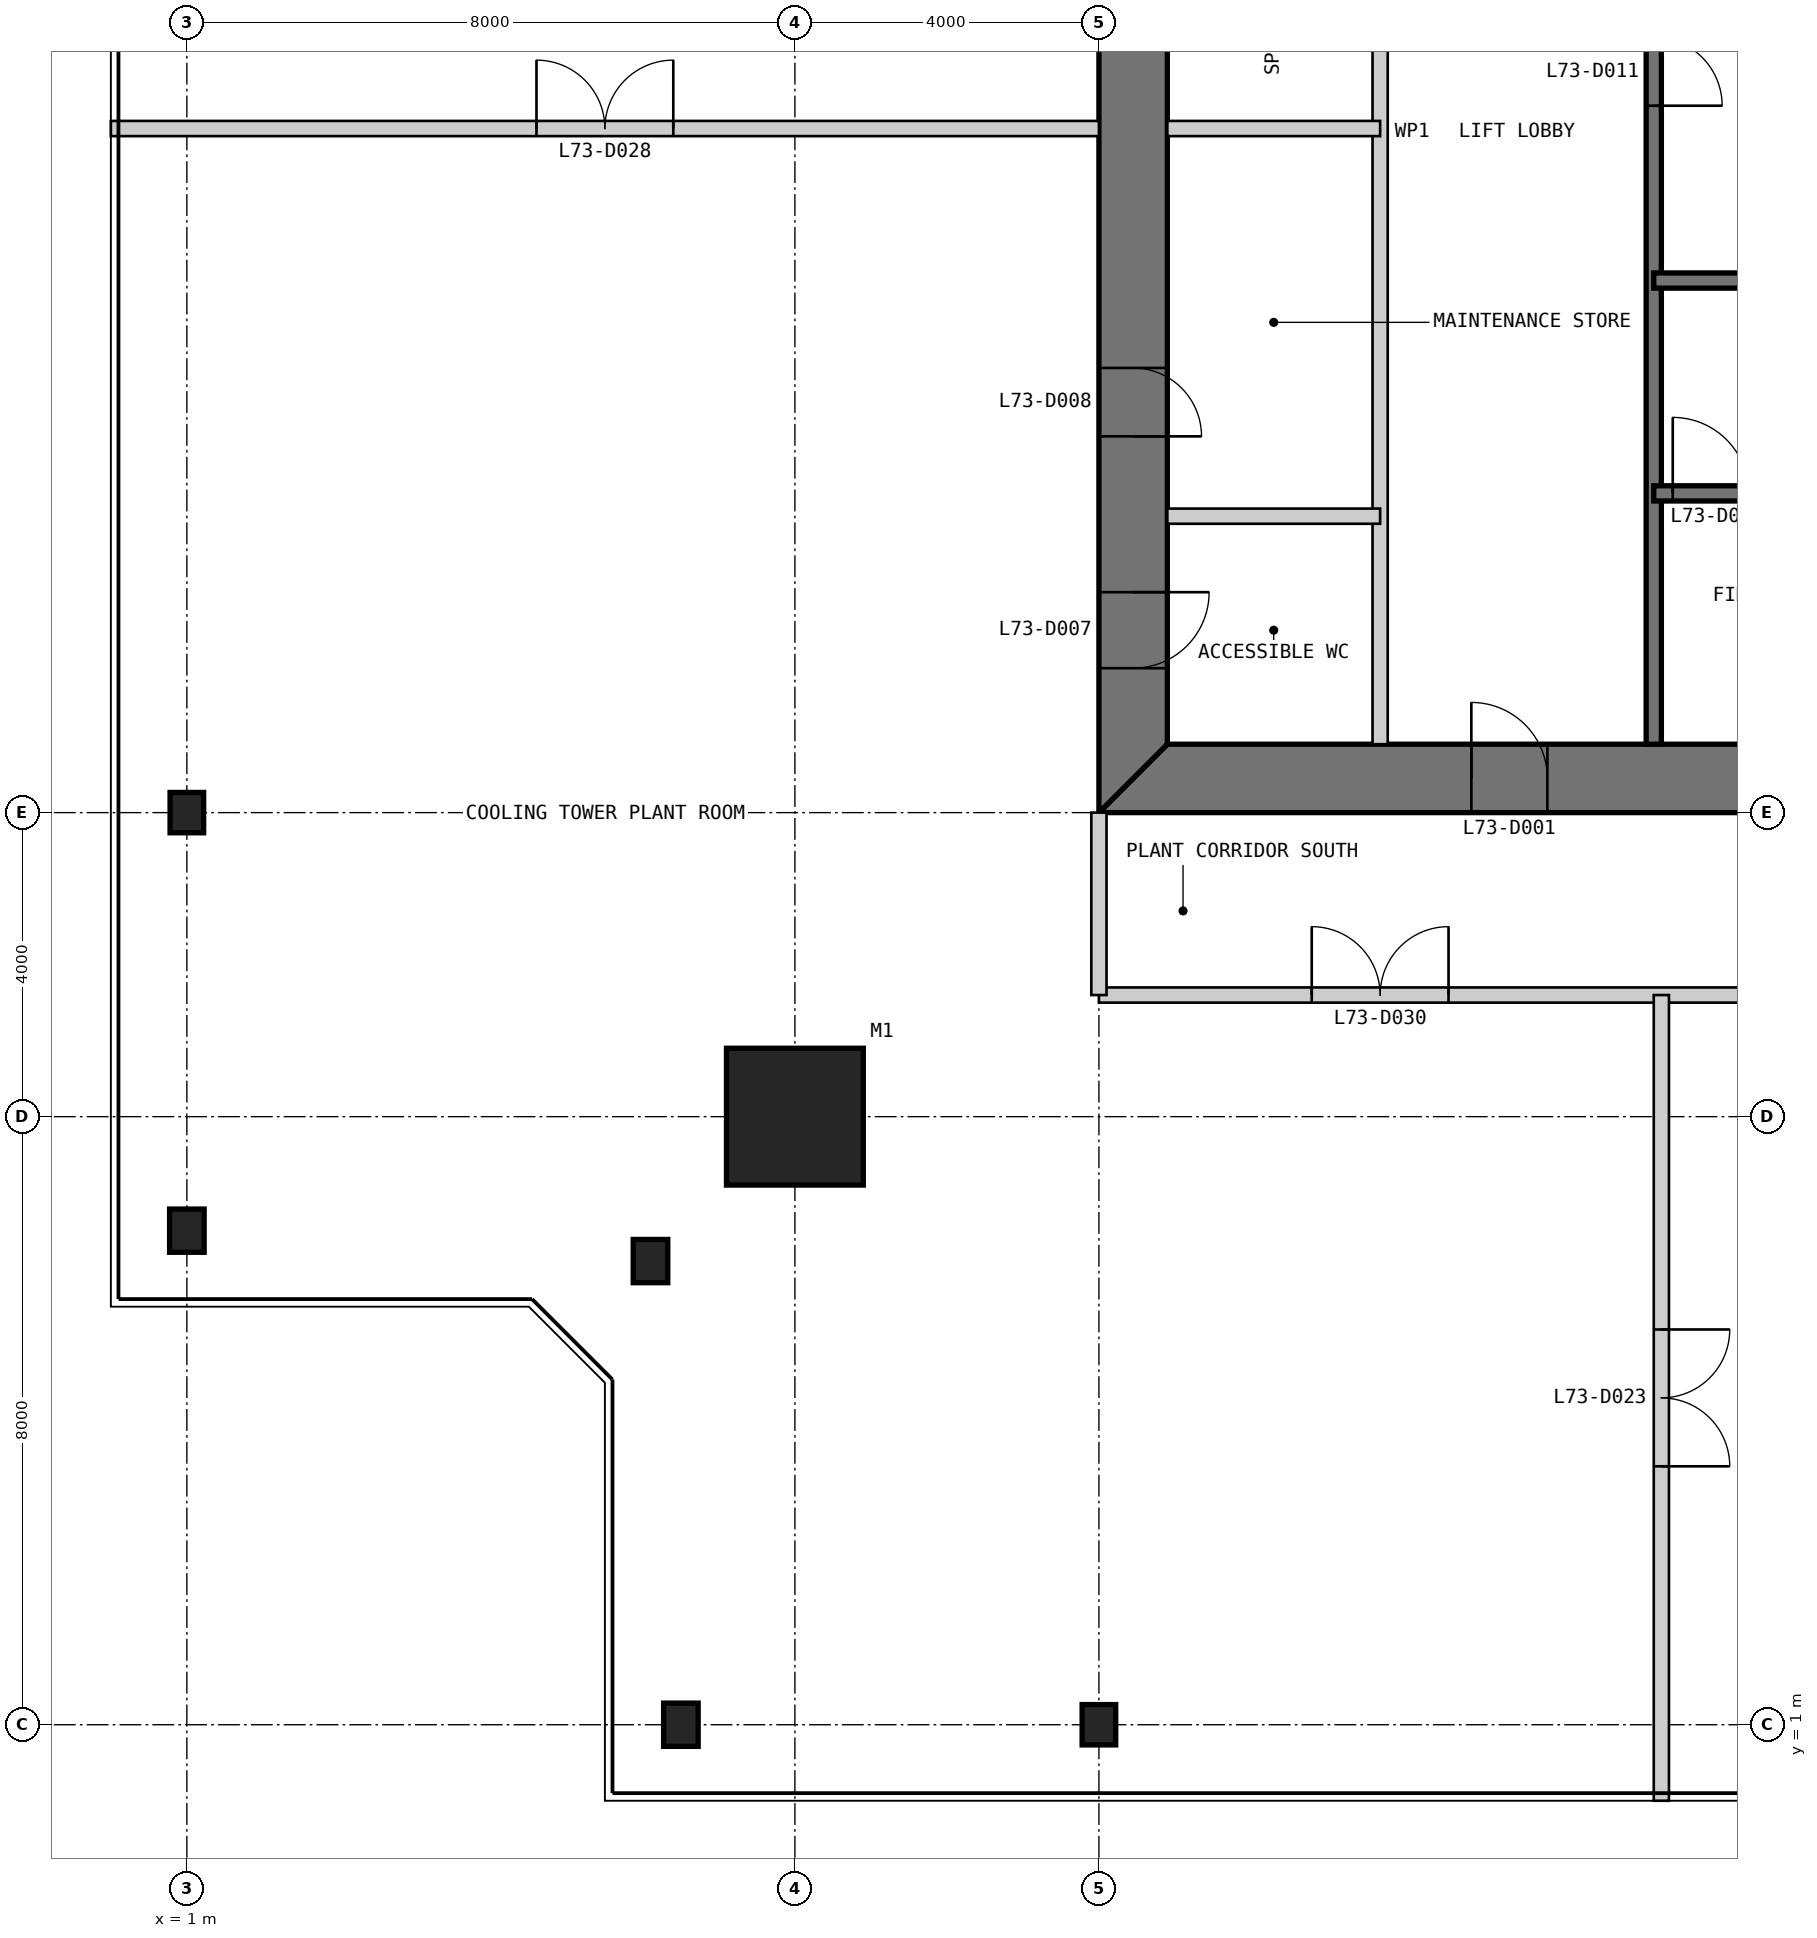
"""IFC4 building model, lengths in metres.
Left out: names, types, materials, properties, quantities, classifications, styles, units other than length and angle.
Written with IfcOpenShell. Run it as: python <this file> out.ifc"""

import sys

from ifc_helpers import new_model, si_unit, direction, frame, frame_2d, origin, origin_2d, place, context, subcontext, project, spatial, polyline, rectangle, i_section, outline, extrude, element, fill, save


model = new_model("IFC4")
c1 = context("Model", 3, precision=1e-05, world=origin(), true_north=direction((0.0, 1.0)))
c2 = subcontext(c1, "Body", "Model", "MODEL_VIEW")
j1 = project(units=[si_unit("LENGTHUNIT", "METRE"), si_unit("PLANEANGLEUNIT", "RADIAN")], contexts=[c1])
p1 = place(None, origin())
s1 = spatial("IfcSite", under=j1, at=p1, CompositionType="ELEMENT")
p2 = place(p1, origin())
s2 = spatial("IfcBuilding", under=s1, at=p2, CompositionType="ELEMENT")
p3 = place(p2, frame((0.0, 0.0, 301.8)))
s3 = spatial("IfcBuildingStorey", under=s2, at=p3, CompositionType="ELEMENT", Elevation=301.8)
p4 = place(p3, frame((9.0, 9.0, 0.0), z_axis=(0.0, 0.0, 1.0), x_axis=(1.0, 0.0, 0.0)))
e1 = element("IfcColumn", 1, at=p4, inside=s3, PredefinedType="COLUMN", context=c2, shape_type="SweptSolid", body=[
    extrude(rectangle(XDim=1.8, YDim=1.8, at=origin_2d()), origin(), (0.0, 0.0, 1.0), 6.0),
])
p5 = place(p3, frame((7.5, 1.0, 0.0), z_axis=(0.0, 0.0, 1.0), x_axis=(1.0, 0.0, 0.0)))
e2 = element("IfcColumn", 2, at=p5, inside=s3, PredefinedType="COLUMN", context=c2, shape_type="SweptSolid", body=[
    extrude(i_section(OverallWidth=0.455, OverallDepth=0.569, WebThickness=0.078, FlangeThickness=0.125, at=origin_2d()), origin(), (0.0, 0.0, 1.0), 6.0),
])
for number, where, z_axis, x_axis in (
    (3, (13.0, 1.0, 0.0), (0.0, 0.0, 1.0), (1.0, 0.0, 0.0)),
    (4, (1.0, 13.0, 0.0), (0.0, 0.0, 1.0), (1.0, 0.0, 0.0)),
):
    element("IfcColumn", number, at=place(p3, frame(where, z_axis=z_axis, x_axis=x_axis)), inside=s3, PredefinedType="COLUMN", context=c2, shape_type="SweptSolid", body=[
        extrude(i_section(OverallWidth=0.442, OverallDepth=0.531, WebThickness=0.066, FlangeThickness=0.106, at=origin_2d()), origin(), (0.0, 0.0, 1.0), 6.0),
    ])
for number, where, z_axis, x_axis in (
    (5, (1.0, 7.5, 0.0), (0.0, 0.0, 1.0), (1.0, 0.0, 0.0)),
    (6, (7.1, 7.1, 0.0), (0.0, 0.0, 1.0), (1.0, 0.0, 0.0)),
):
    element("IfcColumn", number, at=place(p3, frame(where, z_axis=z_axis, x_axis=x_axis)), inside=s3, PredefinedType="COLUMN", context=c2, shape_type="SweptSolid", body=[
        extrude(i_section(OverallWidth=0.455, OverallDepth=0.569, WebThickness=0.078, FlangeThickness=0.125, at=origin_2d()), origin(), (0.0, 0.0, 1.0), 6.0),
    ])
p6 = place(p3, frame((13.0, 13.45, 0.0), z_axis=(0.0, 0.0, 1.0), x_axis=(1.0, 0.0, 0.0)))
e7 = element("IfcWall", 7, at=p6, inside=s3, PredefinedType="SHEAR", context=c2, shape_type="SweptSolid", body=[
    extrude(outline(polyline([(0.0, -0.45), (24.0, -0.45), (23.1, 0.45), (0.9, 0.45), (0.0, -0.45)])), origin(), (0.0, 0.0, 1.0), 6.0),
])
p7 = place(p6, frame((4.9, 0.0, 0.0)))
e8 = element("IfcOpeningElement", 8, at=p7, cuts=e7, PredefinedType="OPENING", context=c2, shape_type="SweptSolid", body=[
    extrude(rectangle(XDim=1.0, YDim=2.2, at=frame_2d((0.5, 1.1))), frame((0.0, 0.46, 0.0), z_axis=(0.0, -1.0, 0.0), x_axis=(1.0, 0.0, 0.0)), (0.0, 0.0, 1.0), 0.92),
])
p8 = place(p6, frame((8.9, 0.0, 0.0)))
e9 = element("IfcOpeningElement", 9, at=p8, cuts=e7, PredefinedType="OPENING", context=c2, shape_type="SweptSolid", body=[
    extrude(rectangle(XDim=1.1, YDim=2.2, at=frame_2d((0.55, 1.1))), frame((0.0, 0.46, 0.0), z_axis=(0.0, -1.0, 0.0), x_axis=(1.0, 0.0, 0.0)), (0.0, 0.0, 1.0), 0.92),
])
p9 = place(p6, frame((15.05, 0.0, 0.0)))
e10 = element("IfcOpeningElement", 10, at=p9, cuts=e7, PredefinedType="OPENING", context=c2, shape_type="SweptSolid", body=[
    extrude(rectangle(XDim=0.9, YDim=2.2, at=frame_2d((0.45, 1.1))), frame((0.0, 0.46, 0.0), z_axis=(0.0, -1.0, 0.0), x_axis=(1.0, 0.0, 0.0)), (0.0, 0.0, 1.0), 0.92),
])
p10 = place(p6, frame((17.9, 0.0, 0.0)))
e11 = element("IfcOpeningElement", 11, at=p10, cuts=e7, PredefinedType="OPENING", context=c2, shape_type="SweptSolid", body=[
    extrude(rectangle(XDim=1.0, YDim=2.2, at=frame_2d((0.5, 1.1))), frame((0.0, 0.46, 0.0), z_axis=(0.0, -1.0, 0.0), x_axis=(1.0, 0.0, 0.0)), (0.0, 0.0, 1.0), 0.92),
])
p11 = place(p6, frame((21.4, 0.0, 0.0)))
e12 = element("IfcOpeningElement", 12, at=p11, cuts=e7, PredefinedType="OPENING", context=c2, shape_type="SweptSolid", body=[
    extrude(rectangle(XDim=1.0, YDim=2.2, at=frame_2d((0.5, 1.1))), frame((0.0, 0.46, 0.0), z_axis=(0.0, -1.0, 0.0), x_axis=(1.0, 0.0, 0.0)), (0.0, 0.0, 1.0), 0.92),
])
p12 = place(p3, frame((13.45, 36.1, 0.0), z_axis=(0.0, 0.0, 1.0), x_axis=(0.0, -1.0, 0.0)))
e13 = element("IfcWall", 13, at=p12, inside=s3, PredefinedType="SHEAR", context=c2, shape_type="SweptSolid", body=[
    extrude(outline(polyline([(-0.9, -0.45), (23.1, -0.45), (22.2, 0.45), (0.0, 0.45), (-0.9, -0.45)])), origin(), (0.0, 0.0, 1.0), 6.0),
])
p13 = place(p12, frame((20.2, 0.0, 0.0)))
e14 = element("IfcOpeningElement", 14, at=p13, cuts=e13, PredefinedType="OPENING", context=c2, shape_type="SweptSolid", body=[
    extrude(rectangle(XDim=1.0, YDim=2.2, at=frame_2d((0.5, 1.1))), frame((0.0, 0.46, 0.0), z_axis=(0.0, -1.0, 0.0), x_axis=(1.0, 0.0, 0.0)), (0.0, 0.0, 1.0), 0.92),
])
p14 = place(p12, frame((17.25, 0.0, 0.0)))
e15 = element("IfcOpeningElement", 15, at=p14, cuts=e13, PredefinedType="OPENING", context=c2, shape_type="SweptSolid", body=[
    extrude(rectangle(XDim=0.9, YDim=2.2, at=frame_2d((0.45, 1.1))), frame((0.0, 0.46, 0.0), z_axis=(0.0, -1.0, 0.0), x_axis=(1.0, 0.0, 0.0)), (0.0, 0.0, 1.0), 0.92),
])
p15 = place(p3, frame((16.7, 13.9, 0.0), z_axis=(0.0, 0.0, 1.0), x_axis=(0.0, 1.0, 0.0)))
e16 = element("IfcWall", 16, at=p15, inside=s3, PredefinedType="PARTITIONING", context=c2, shape_type="SweptSolid", body=[
    extrude(rectangle(XDim=16.1, YDim=0.2, at=frame_2d((8.05, 0.0))), origin(), (0.0, 0.0, 1.0), 5.8),
])
p16 = place(p15, frame((9.65, 0.0, 0.0)))
e17 = element("IfcOpeningElement", 17, at=p16, cuts=e16, PredefinedType="OPENING", context=c2, shape_type="SweptSolid", body=[
    extrude(rectangle(XDim=0.9, YDim=2.2, at=frame_2d((0.45, 1.1))), frame((0.0, 0.11, 0.0), z_axis=(0.0, -1.0, 0.0), x_axis=(1.0, 0.0, 0.0)), (0.0, 0.0, 1.0), 0.22),
])
p17 = place(p15, frame((13.65, 0.0, 0.0)))
e18 = element("IfcOpeningElement", 18, at=p17, cuts=e16, PredefinedType="OPENING", context=c2, shape_type="SweptSolid", body=[
    extrude(rectangle(XDim=0.9, YDim=2.2, at=frame_2d((0.45, 1.1))), frame((0.0, 0.11, 0.0), z_axis=(0.0, -1.0, 0.0), x_axis=(1.0, 0.0, 0.0)), (0.0, 0.0, 1.0), 0.22),
])
p18 = place(p3, frame((20.3, 13.9, 0.0), z_axis=(0.0, 0.0, 1.0), x_axis=(0.0, 1.0, 0.0)))
e19 = element("IfcWall", 19, at=p18, inside=s3, PredefinedType="SOLIDWALL", context=c2, shape_type="SweptSolid", body=[
    extrude(rectangle(XDim=16.1, YDim=0.2, at=frame_2d((8.05, 0.0))), origin(), (0.0, 0.0, 1.0), 5.8),
])
p19 = place(p18, frame((8.4, 0.0, 0.0)))
e20 = element("IfcOpeningElement", 20, at=p19, cuts=e19, PredefinedType="OPENING", context=c2, shape_type="SweptSolid", body=[
    extrude(rectangle(XDim=0.9, YDim=2.2, at=frame_2d((0.45, 1.1))), frame((0.0, 0.11, 0.0), z_axis=(0.0, -1.0, 0.0), x_axis=(1.0, 0.0, 0.0)), (0.0, 0.0, 1.0), 0.22),
])
p20 = place(p18, frame((13.4, 0.0, 0.0)))
e21 = element("IfcOpeningElement", 21, at=p20, cuts=e19, PredefinedType="OPENING", context=c2, shape_type="SweptSolid", body=[
    extrude(rectangle(XDim=0.9, YDim=2.2, at=frame_2d((0.45, 1.1))), frame((0.0, 0.11, 0.0), z_axis=(0.0, -1.0, 0.0), x_axis=(1.0, 0.0, 0.0)), (0.0, 0.0, 1.0), 0.22),
])
p21 = place(p3, frame((20.3, 17.2, 0.0), z_axis=(0.0, 0.0, 1.0), x_axis=(1.0, 0.0, 0.0)))
e22 = element("IfcWall", 22, at=p21, inside=s3, PredefinedType="SOLIDWALL", context=c2, shape_type="SweptSolid", body=[
    extrude(rectangle(XDim=9.4, YDim=0.2, at=frame_2d((4.7, 0.0))), origin(), (0.0, 0.0, 1.0), 5.8),
])
p22 = place(p21, frame((0.25, 0.0, 0.0)))
e23 = element("IfcOpeningElement", 23, at=p22, cuts=e22, PredefinedType="OPENING", context=c2, shape_type="SweptSolid", body=[
    extrude(rectangle(XDim=1.0, YDim=2.2, at=frame_2d((0.5, 1.1))), frame((0.0, 0.11, 0.0), z_axis=(0.0, -1.0, 0.0), x_axis=(1.0, 0.0, 0.0)), (0.0, 0.0, 1.0), 0.22),
])
p23 = place(p3, frame((20.3, 20.0, 0.0), z_axis=(0.0, 0.0, 1.0), x_axis=(1.0, 0.0, 0.0)))
e24 = element("IfcWall", 24, at=p23, inside=s3, PredefinedType="SOLIDWALL", context=c2, shape_type="SweptSolid", body=[
    extrude(rectangle(XDim=15.8, YDim=0.2, at=frame_2d((7.9, 0.0))), origin(), (0.0, 0.0, 1.0), 5.8),
])
for number, where, z_axis, x_axis in (
    (25, (13.9, 16.9, 0.0), (0.0, 0.0, 1.0), (1.0, 0.0, 0.0)),
    (26, (13.9, 22.0, 0.0), (0.0, 0.0, 1.0), (1.0, 0.0, 0.0)),
):
    element("IfcWall", number, at=place(p3, frame(where, z_axis=z_axis, x_axis=x_axis)), inside=s3, PredefinedType="PARTITIONING", context=c2, shape_type="SweptSolid", body=[
        extrude(rectangle(XDim=2.8, YDim=0.2, at=frame_2d((1.4, 0.0))), origin(), (0.0, 0.0, 1.0), 5.8),
    ])
p24 = place(p3, frame((13.0, 10.6, 0.0), z_axis=(0.0, 0.0, 1.0), x_axis=(1.0, 0.0, 0.0)))
e27 = element("IfcWall", 27, at=p24, inside=s3, PredefinedType="PARTITIONING", context=c2, shape_type="SweptSolid", body=[
    extrude(rectangle(XDim=24.0, YDim=0.2, at=frame_2d((12.0, 0.0))), origin(), (0.0, 0.0, 1.0), 5.8),
])
p25 = place(p24, frame((2.8, 0.0, 0.0)))
e28 = element("IfcOpeningElement", 28, at=p25, cuts=e27, PredefinedType="OPENING", context=c2, shape_type="SweptSolid", body=[
    extrude(rectangle(XDim=1.8, YDim=2.4, at=frame_2d((0.9, 1.2))), frame((0.0, 0.11, 0.0), z_axis=(0.0, -1.0, 0.0), x_axis=(1.0, 0.0, 0.0)), (0.0, 0.0, 1.0), 0.22),
])
p26 = place(p24, frame((11.25, 0.0, 0.0)))
e29 = element("IfcOpeningElement", 29, at=p26, cuts=e27, PredefinedType="OPENING", context=c2, shape_type="SweptSolid", body=[
    extrude(rectangle(XDim=1.8, YDim=2.4, at=frame_2d((0.9, 1.2))), frame((0.0, 0.11, 0.0), z_axis=(0.0, -1.0, 0.0), x_axis=(1.0, 0.0, 0.0)), (0.0, 0.0, 1.0), 0.22),
])
p27 = place(p24, frame((19.55, 0.0, 0.0)))
e30 = element("IfcOpeningElement", 30, at=p27, cuts=e27, PredefinedType="OPENING", context=c2, shape_type="SweptSolid", body=[
    extrude(rectangle(XDim=1.8, YDim=2.4, at=frame_2d((0.9, 1.2))), frame((0.0, 0.11, 0.0), z_axis=(0.0, -1.0, 0.0), x_axis=(1.0, 0.0, 0.0)), (0.0, 0.0, 1.0), 0.22),
])
p28 = place(p3, frame((13.0, 10.6, 0.0), z_axis=(0.0, 0.0, 1.0), x_axis=(0.0, 1.0, 0.0)))
e31 = element("IfcWall", 31, at=p28, inside=s3, PredefinedType="PARTITIONING", context=c2, shape_type="SweptSolid", body=[
    extrude(rectangle(XDim=2.4, YDim=0.2, at=frame_2d((1.2, 0.0))), origin(), (0.0, 0.0, 1.0), 4.853),
])
p29 = place(p3, frame((20.4, 0.0, 0.0), z_axis=(0.0, 0.0, 1.0), x_axis=(0.0, 1.0, 0.0)))
e32 = element("IfcWall", 32, at=p29, inside=s3, PredefinedType="PARTITIONING", context=c2, shape_type="SweptSolid", body=[
    extrude(rectangle(XDim=10.6, YDim=0.2, at=frame_2d((5.3, 0.0))), origin(), (0.0, 0.0, 1.0), 5.8),
])
p30 = place(p29, frame((4.4, 0.0, 0.0)))
e33 = element("IfcOpeningElement", 33, at=p30, cuts=e32, PredefinedType="OPENING", context=c2, shape_type="SweptSolid", body=[
    extrude(rectangle(XDim=1.8, YDim=2.4, at=frame_2d((0.9, 1.2))), frame((0.0, 0.11, 0.0), z_axis=(0.0, -1.0, 0.0), x_axis=(1.0, 0.0, 0.0)), (0.0, 0.0, 1.0), 0.22),
])
p31 = place(p3, frame((0.0, 22.0, 0.0), z_axis=(0.0, 0.0, 1.0), x_axis=(1.0, 0.0, 0.0)))
e34 = element("IfcWall", 34, at=p31, inside=s3, PredefinedType="PARTITIONING", context=c2, shape_type="SweptSolid", body=[
    extrude(rectangle(XDim=13.0, YDim=0.2, at=frame_2d((6.5, 0.0))), origin(), (0.0, 0.0, 1.0), 5.8),
])
p32 = place(p31, frame((5.6, 0.0, 0.0)))
e35 = element("IfcOpeningElement", 35, at=p32, cuts=e34, PredefinedType="OPENING", context=c2, shape_type="SweptSolid", body=[
    extrude(rectangle(XDim=1.8, YDim=2.4, at=frame_2d((0.9, 1.2))), frame((0.0, 0.11, 0.0), z_axis=(0.0, -1.0, 0.0), x_axis=(1.0, 0.0, 0.0)), (0.0, 0.0, 1.0), 0.22),
])
p33 = place(p7, origin())
e36 = element("IfcDoor", 36, at=p33, inside=s3, OperationType="SINGLE_SWING_LEFT", PredefinedType="DOOR", context=c2, shape_type="SweptSolid", body=[
    extrude(rectangle(XDim=1.0, YDim=2.2, at=frame_2d((0.5, 1.1))), frame((0.0, 0.025, 0.0), z_axis=(0.0, -1.0, 0.0), x_axis=(1.0, 0.0, 0.0)), (0.0, 0.0, 1.0), 0.05),
    extrude(outline(polyline([(0.0, 0.0), (0.04, 0.0), (0.04, 2.16), (0.96, 2.16), (0.96, 0.0), (1.0, 0.0), (1.0, 2.2), (0.0, 2.2), (0.0, 0.0)])), frame((0.0, 0.3, 0.0), z_axis=(0.0, -1.0, 0.0), x_axis=(1.0, 0.0, 0.0)), (0.0, 0.0, 1.0), 0.6),
])
fill(e8, e36)
p34 = place(p22, origin())
e37 = element("IfcDoor", 37, at=p34, inside=s3, OperationType="SINGLE_SWING_LEFT", PredefinedType="DOOR", context=c2, shape_type="SweptSolid", body=[
    extrude(rectangle(XDim=1.0, YDim=2.2, at=frame_2d((0.5, 1.1))), frame((0.0, 0.025, 0.0), z_axis=(0.0, -1.0, 0.0), x_axis=(1.0, 0.0, 0.0)), (0.0, 0.0, 1.0), 0.05),
])
fill(e23, e37)
p35 = place(p13, origin())
e38 = element("IfcDoor", 38, at=p35, inside=s3, OperationType="SINGLE_SWING_LEFT", PredefinedType="DOOR", context=c2, shape_type="SweptSolid", body=[
    extrude(rectangle(XDim=1.0, YDim=2.2, at=frame_2d((0.5, 1.1))), frame((0.0, 0.025, 0.0), z_axis=(0.0, -1.0, 0.0), x_axis=(1.0, 0.0, 0.0)), (0.0, 0.0, 1.0), 0.05),
    extrude(outline(polyline([(0.0, 0.0), (0.04, 0.0), (0.04, 2.16), (0.96, 2.16), (0.96, 0.0), (1.0, 0.0), (1.0, 2.2), (0.0, 2.2), (0.0, 0.0)])), frame((0.0, 0.3, 0.0), z_axis=(0.0, -1.0, 0.0), x_axis=(1.0, 0.0, 0.0)), (0.0, 0.0, 1.0), 0.6),
])
fill(e14, e38)
p36 = place(p14, origin())
e39 = element("IfcDoor", 39, at=p36, inside=s3, OperationType="SINGLE_SWING_RIGHT", PredefinedType="DOOR", context=c2, shape_type="SweptSolid", body=[
    extrude(rectangle(XDim=0.9, YDim=2.2, at=frame_2d((0.45, 1.1))), frame((0.0, 0.025, 0.0), z_axis=(0.0, -1.0, 0.0), x_axis=(1.0, 0.0, 0.0)), (0.0, 0.0, 1.0), 0.05),
    extrude(outline(polyline([(0.0, 0.0), (0.04, 0.0), (0.04, 2.16), (0.86, 2.16), (0.86, 0.0), (0.9, 0.0), (0.9, 2.2), (0.0, 2.2), (0.0, 0.0)])), frame((0.0, 0.3, 0.0), z_axis=(0.0, -1.0, 0.0), x_axis=(1.0, 0.0, 0.0)), (0.0, 0.0, 1.0), 0.6),
])
fill(e15, e39)
p37 = place(p19, frame((0.9, 0.0, 0.0), z_axis=(0.0, 0.0, 1.0), x_axis=(-1.0, 0.0, 0.0)))
e40 = element("IfcDoor", 40, at=p37, inside=s3, OperationType="SINGLE_SWING_RIGHT", PredefinedType="DOOR", context=c2, shape_type="SweptSolid", body=[
    extrude(rectangle(XDim=0.9, YDim=2.2, at=frame_2d((0.45, 1.1))), frame((0.0, 0.025, 0.0), z_axis=(0.0, -1.0, 0.0), x_axis=(1.0, 0.0, 0.0)), (0.0, 0.0, 1.0), 0.05),
])
fill(e20, e40)
p38 = place(p30, frame((1.8, 0.0, 0.0), z_axis=(0.0, 0.0, 1.0), x_axis=(-1.0, 0.0, 0.0)))
e41 = element("IfcDoor", 41, at=p38, inside=s3, OperationType="DOUBLE_DOOR_SINGLE_SWING", PredefinedType="DOOR", context=c2, shape_type="SweptSolid", body=[
    extrude(rectangle(XDim=1.8, YDim=2.4, at=frame_2d((0.9, 1.2))), frame((0.0, 0.025, 0.0), z_axis=(0.0, -1.0, 0.0), x_axis=(1.0, 0.0, 0.0)), (0.0, 0.0, 1.0), 0.05),
])
fill(e33, e41)
p39 = place(p32, origin())
e42 = element("IfcDoor", 42, at=p39, inside=s3, OperationType="DOUBLE_DOOR_SINGLE_SWING", PredefinedType="DOOR", context=c2, shape_type="SweptSolid", body=[
    extrude(rectangle(XDim=1.8, YDim=2.4, at=frame_2d((0.9, 1.2))), frame((0.0, 0.025, 0.0), z_axis=(0.0, -1.0, 0.0), x_axis=(1.0, 0.0, 0.0)), (0.0, 0.0, 1.0), 0.05),
])
fill(e35, e42)
p40 = place(p25, origin())
e43 = element("IfcDoor", 43, at=p40, inside=s3, OperationType="DOUBLE_DOOR_SINGLE_SWING", PredefinedType="DOOR", context=c2, shape_type="SweptSolid", body=[
    extrude(rectangle(XDim=1.8, YDim=2.4, at=frame_2d((0.9, 1.2))), frame((0.0, 0.025, 0.0), z_axis=(0.0, -1.0, 0.0), x_axis=(1.0, 0.0, 0.0)), (0.0, 0.0, 1.0), 0.05),
])
fill(e28, e43)
save(model, sys.argv[1])
